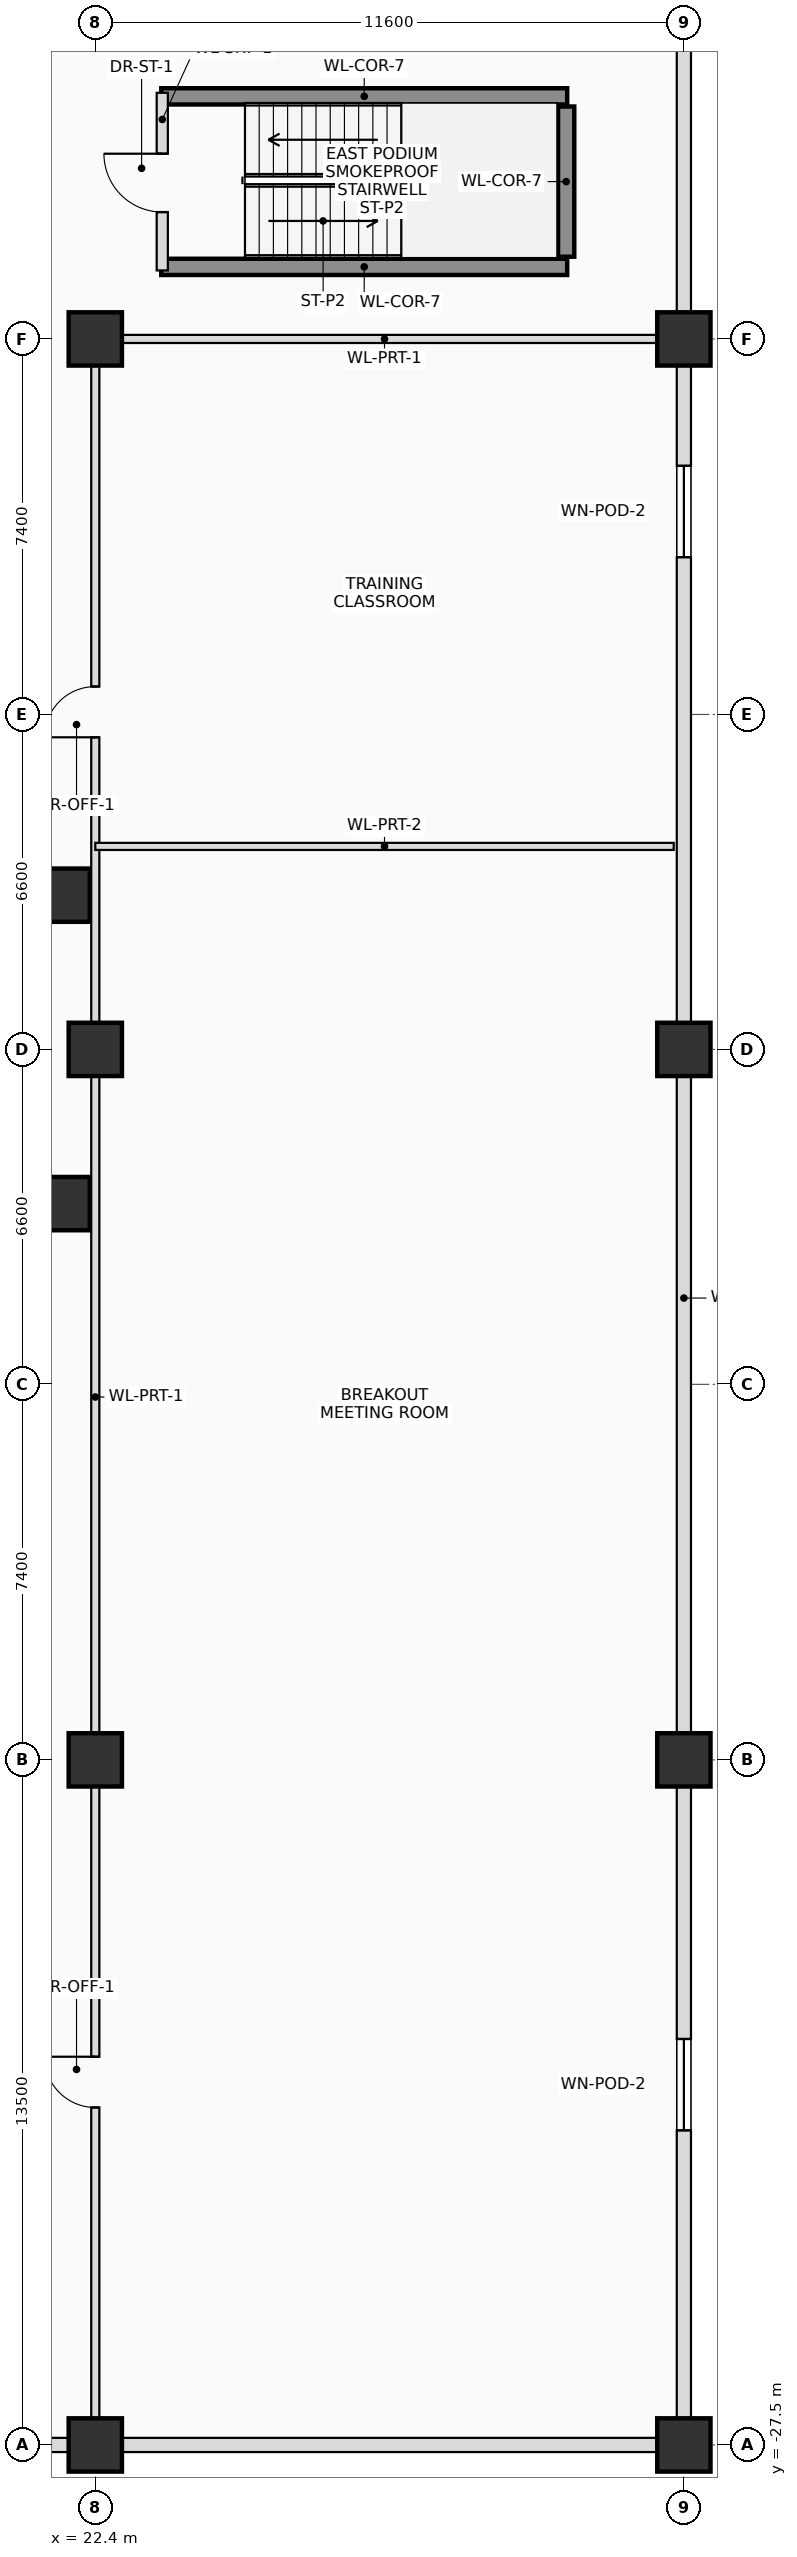
"""IFC4 building model, lengths in metres.
Left out: names, types, materials, properties, quantities, classifications, styles, units other than length and angle.
Written with IfcOpenShell. Run it as: python <this file> out.ifc"""

import sys

from ifc_helpers import new_model, si_unit, direction, frame, frame_2d, origin, origin_2d, place, context, subcontext, project, spatial, rectangle, extrude, source, transform, mapped, element, fill, save


model = new_model("IFC4")
c1 = context("Model", 3, precision=1e-05, world=origin(), true_north=direction((0.0, 1.0)))
c2 = subcontext(c1, "Body", "Model", "MODEL_VIEW")
j1 = project(units=[si_unit("LENGTHUNIT", "METRE"), si_unit("PLANEANGLEUNIT", "RADIAN")], contexts=[c1])
p1 = place(None, origin())
s1 = spatial("IfcSite", under=j1, at=p1, CompositionType="ELEMENT")
p2 = place(p1, origin())
s2 = spatial("IfcBuilding", under=s1, at=p2, CompositionType="ELEMENT")
p3 = place(p2, frame((0.0, 0.0, 12.3)))
s3 = spatial("IfcBuildingStorey", under=s2, at=p3, CompositionType="ELEMENT", Elevation=12.3)
for number, where, z_axis, x_axis in (
    (1, (23.7, 18.78, 0.0), (0.0, 0.0, 1.0), (1.0, 0.0, 0.0)),
    (2, (23.7, 15.42, 0.0), (0.0, 0.0, 1.0), (1.0, 0.0, 0.0)),
):
    element("IfcWall", number, at=place(p3, frame(where, z_axis=z_axis, x_axis=x_axis)), inside=s3, PredefinedType="SHEAR", context=c2, shape_type="SweptSolid", body=[
        extrude(rectangle(XDim=8.0, YDim=0.32, at=frame_2d((4.0, 0.0))), origin(), (0.0, 0.0, 1.0), 3.9),
    ])
p4 = place(p3, frame((31.68, 15.62, 0.0), z_axis=(0.0, 0.0, 1.0), x_axis=(0.0, 1.0, 0.0)))
e3 = element("IfcWall", 3, at=p4, inside=s3, PredefinedType="SHEAR", context=c2, shape_type="SweptSolid", body=[
    extrude(rectangle(XDim=2.96, YDim=0.32, at=frame_2d((1.48, 0.0))), origin(), (0.0, 0.0, 1.0), 3.9),
])
m1 = source(origin(), c2, "Body", "SweptSolid", [
    extrude(rectangle(XDim=1.05, YDim=1.05, at=origin_2d()), origin(), (0.0, 0.0, 1.0), 3.9),
])
for number, where, z_axis, x_axis in (
    (4, (22.4, -27.5, 0.0), (0.0, 0.0, 1.0), (1.0, 0.0, 0.0)),
    (5, (34.0, -27.5, 0.0), (0.0, 0.0, 1.0), (1.0, 0.0, 0.0)),
    (6, (22.4, -14.0, 0.0), (0.0, 0.0, 1.0), (1.0, 0.0, 0.0)),
    (7, (34.0, -14.0, 0.0), (0.0, 0.0, 1.0), (1.0, 0.0, 0.0)),
    (8, (22.4, 0.0, 0.0), (0.0, 0.0, 1.0), (1.0, 0.0, 0.0)),
    (9, (34.0, 0.0, 0.0), (0.0, 0.0, 1.0), (1.0, 0.0, 0.0)),
    (10, (22.4, 14.0, 0.0), (0.0, 0.0, 1.0), (1.0, 0.0, 0.0)),
    (11, (34.0, 14.0, 0.0), (0.0, 0.0, 1.0), (1.0, 0.0, 0.0)),
    (12, (21.766, -3.039, 0.0), (0.0, 0.0, 1.0), (1.0, 0.0, 0.0)),
    (13, (21.766, 3.039, 0.0), (0.0, 0.0, 1.0), (1.0, 0.0, 0.0)),
):
    element("IfcColumn", number, at=place(p3, frame(where, z_axis=z_axis, x_axis=x_axis)), inside=s3, PredefinedType="COLUMN", context=c2, shape_type="MappedRepresentation", body=[
        mapped(m1, transform((0.0, 0.0, 0.0), scale=1.0)),
    ])
p5 = place(p3, frame((34.0, 29.5, 0.0), z_axis=(0.0, 0.0, 1.0), x_axis=(0.0, -1.0, 0.0)))
e14 = element("IfcWall", 14, at=p5, inside=s3, PredefinedType="SOLIDWALL", context=c2, shape_type="SweptSolid", body=[
    extrude(rectangle(XDim=57.0, YDim=0.28, at=frame_2d((28.5, 0.0))), origin(), (0.0, 0.0, 1.0), 2.65),
])
p6 = place(p5, frame((18.0, 0.0, 0.65)))
e15 = element("IfcOpeningElement", 15, at=p6, cuts=e14, PredefinedType="OPENING", context=c2, shape_type="SweptSolid", body=[
    extrude(rectangle(XDim=1.8, YDim=1.8, at=frame_2d((0.9, 0.9))), frame((0.0, 0.15, 0.0), z_axis=(0.0, -1.0, 0.0), x_axis=(1.0, 0.0, 0.0)), (0.0, 0.0, 1.0), 0.3),
])
p7 = place(p5, frame((49.0, 0.0, 0.65)))
e16 = element("IfcOpeningElement", 16, at=p7, cuts=e14, PredefinedType="OPENING", context=c2, shape_type="SweptSolid", body=[
    extrude(rectangle(XDim=1.8, YDim=1.8, at=frame_2d((0.9, 0.9))), frame((0.0, 0.15, 0.0), z_axis=(0.0, -1.0, 0.0), x_axis=(1.0, 0.0, 0.0)), (0.0, 0.0, 1.0), 0.3),
])
p8 = place(p3, frame((34.0, -27.5, 0.0), z_axis=(0.0, 0.0, 1.0), x_axis=(-1.0, 0.0, 0.0)))
e17 = element("IfcWall", 17, at=p8, inside=s3, PredefinedType="SOLIDWALL", context=c2, shape_type="SweptSolid", body=[
    extrude(rectangle(XDim=68.0, YDim=0.28, at=frame_2d((34.0, 0.0))), origin(), (0.0, 0.0, 1.0), 2.65),
])
p9 = place(p8, frame((16.0, 0.0, 0.65)))
e18 = element("IfcOpeningElement", 18, at=p9, cuts=e17, PredefinedType="OPENING", context=c2, shape_type="SweptSolid", body=[
    extrude(rectangle(XDim=1.8, YDim=1.8, at=frame_2d((0.9, 0.9))), frame((0.0, 0.15, 0.0), z_axis=(0.0, -1.0, 0.0), x_axis=(1.0, 0.0, 0.0)), (0.0, 0.0, 1.0), 0.3),
])
p10 = place(p8, frame((49.0, 0.0, 0.65)))
e19 = element("IfcOpeningElement", 19, at=p10, cuts=e17, PredefinedType="OPENING", context=c2, shape_type="SweptSolid", body=[
    extrude(rectangle(XDim=1.8, YDim=1.8, at=frame_2d((0.9, 0.9))), frame((0.0, 0.15, 0.0), z_axis=(0.0, -1.0, 0.0), x_axis=(1.0, 0.0, 0.0)), (0.0, 0.0, 1.0), 0.3),
])
p11 = place(p3, frame((23.72, 15.35, 0.0), z_axis=(0.0, 0.0, 1.0), x_axis=(0.0, 1.0, 0.0)))
e20 = element("IfcWall", 20, at=p11, inside=s3, PredefinedType="PLUMBINGWALL", context=c2, shape_type="SweptSolid", body=[
    extrude(rectangle(XDim=3.5, YDim=0.22, at=frame_2d((1.75, 0.0))), origin(), (0.0, 0.0, 1.0), 3.57),
])
p12 = place(p11, frame((1.15, 0.0, 0.0)))
e21 = element("IfcOpeningElement", 21, at=p12, cuts=e20, PredefinedType="OPENING", context=c2, shape_type="SweptSolid", body=[
    extrude(rectangle(XDim=1.15, YDim=2.15, at=frame_2d((0.575, 1.075))), frame((0.0, 0.12, 0.0), z_axis=(0.0, -1.0, 0.0), x_axis=(1.0, 0.0, 0.0)), (0.0, 0.0, 1.0), 0.24),
])
p13 = place(p3, frame((22.4, -27.35, 0.0), z_axis=(0.0, 0.0, 1.0), x_axis=(0.0, 1.0, 0.0)))
e22 = element("IfcWall", 22, at=p13, inside=s3, PredefinedType="PARTITIONING", context=c2, shape_type="SweptSolid", body=[
    extrude(rectangle(XDim=41.35, YDim=0.16, at=frame_2d((20.675, 0.0))), origin(), (0.0, 0.0, 1.0), 2.775),
])
p14 = place(p13, frame((6.5, 0.0, 0.0)))
e23 = element("IfcOpeningElement", 23, at=p14, cuts=e22, PredefinedType="OPENING", context=c2, shape_type="SweptSolid", body=[
    extrude(rectangle(XDim=1.0, YDim=2.25, at=frame_2d((0.5, 1.125))), frame((0.0, 0.09, 0.0), z_axis=(0.0, -1.0, 0.0), x_axis=(1.0, 0.0, 0.0)), (0.0, 0.0, 1.0), 0.18),
])
p15 = place(p13, frame((33.5, 0.0, 0.0)))
e24 = element("IfcOpeningElement", 24, at=p15, cuts=e22, PredefinedType="OPENING", context=c2, shape_type="SweptSolid", body=[
    extrude(rectangle(XDim=1.0, YDim=2.25, at=frame_2d((0.5, 1.125))), frame((0.0, 0.09, 0.0), z_axis=(0.0, -1.0, 0.0), x_axis=(1.0, 0.0, 0.0)), (0.0, 0.0, 1.0), 0.18),
])
p16 = place(p3, frame((22.4, 14.0, 0.0), z_axis=(0.0, 0.0, 1.0), x_axis=(1.0, 0.0, 0.0)))
e25 = element("IfcWall", 25, at=p16, inside=s3, PredefinedType="PARTITIONING", context=c2, shape_type="SweptSolid", body=[
    extrude(rectangle(XDim=11.4, YDim=0.16, at=frame_2d((5.7, 0.0))), origin(), (0.0, 0.0, 1.0), 2.775),
])
p17 = place(p3, frame((22.4, 4.0, 0.0), z_axis=(0.0, 0.0, 1.0), x_axis=(1.0, 0.0, 0.0)))
e26 = element("IfcWall", 26, at=p17, inside=s3, PredefinedType="PARTITIONING", context=c2, shape_type="SweptSolid", body=[
    extrude(rectangle(XDim=11.4, YDim=0.14, at=frame_2d((5.7, 0.0))), origin(), (0.0, 0.0, 1.0), 2.775),
])
p18 = place(p6, origin())
e27 = element("IfcWindow", 27, at=p18, inside=s3, PartitioningType="SINGLE_PANEL", PredefinedType="WINDOW", context=c2, shape_type="SweptSolid", body=[
    extrude(rectangle(XDim=1.8, YDim=1.8, at=frame_2d((0.9, 0.9))), frame((0.0, 0.03, 0.0), z_axis=(0.0, -1.0, 0.0), x_axis=(1.0, 0.0, 0.0)), (0.0, 0.0, 1.0), 0.06),
])
fill(e15, e27)
p19 = place(p7, origin())
e28 = element("IfcWindow", 28, at=p19, inside=s3, PartitioningType="SINGLE_PANEL", PredefinedType="WINDOW", context=c2, shape_type="SweptSolid", body=[
    extrude(rectangle(XDim=1.8, YDim=1.8, at=frame_2d((0.9, 0.9))), frame((0.0, 0.03, 0.0), z_axis=(0.0, -1.0, 0.0), x_axis=(1.0, 0.0, 0.0)), (0.0, 0.0, 1.0), 0.06),
])
fill(e16, e28)
p20 = place(p12, origin())
e29 = element("IfcDoor", 29, at=p20, inside=s3, OperationType="SINGLE_SWING_RIGHT", PredefinedType="DOOR", context=c2, shape_type="SweptSolid", body=[
    extrude(rectangle(XDim=1.15, YDim=2.15, at=frame_2d((0.575, 1.075))), frame((0.0, 0.025, 0.0), z_axis=(0.0, -1.0, 0.0), x_axis=(1.0, 0.0, 0.0)), (0.0, 0.0, 1.0), 0.05),
])
fill(e21, e29)
p21 = place(p14, origin())
e30 = element("IfcDoor", 30, at=p21, inside=s3, OperationType="SINGLE_SWING_RIGHT", PredefinedType="DOOR", context=c2, shape_type="SweptSolid", body=[
    extrude(rectangle(XDim=1.0, YDim=2.25, at=frame_2d((0.5, 1.125))), frame((0.0, 0.025, 0.0), z_axis=(0.0, -1.0, 0.0), x_axis=(1.0, 0.0, 0.0)), (0.0, 0.0, 1.0), 0.05),
])
fill(e23, e30)
p22 = place(p15, origin())
e31 = element("IfcDoor", 31, at=p22, inside=s3, OperationType="SINGLE_SWING_LEFT", PredefinedType="DOOR", context=c2, shape_type="SweptSolid", body=[
    extrude(rectangle(XDim=1.0, YDim=2.25, at=frame_2d((0.5, 1.125))), frame((0.0, 0.025, 0.0), z_axis=(0.0, -1.0, 0.0), x_axis=(1.0, 0.0, 0.0)), (0.0, 0.0, 1.0), 0.05),
])
fill(e24, e31)
save(model, sys.argv[1])
